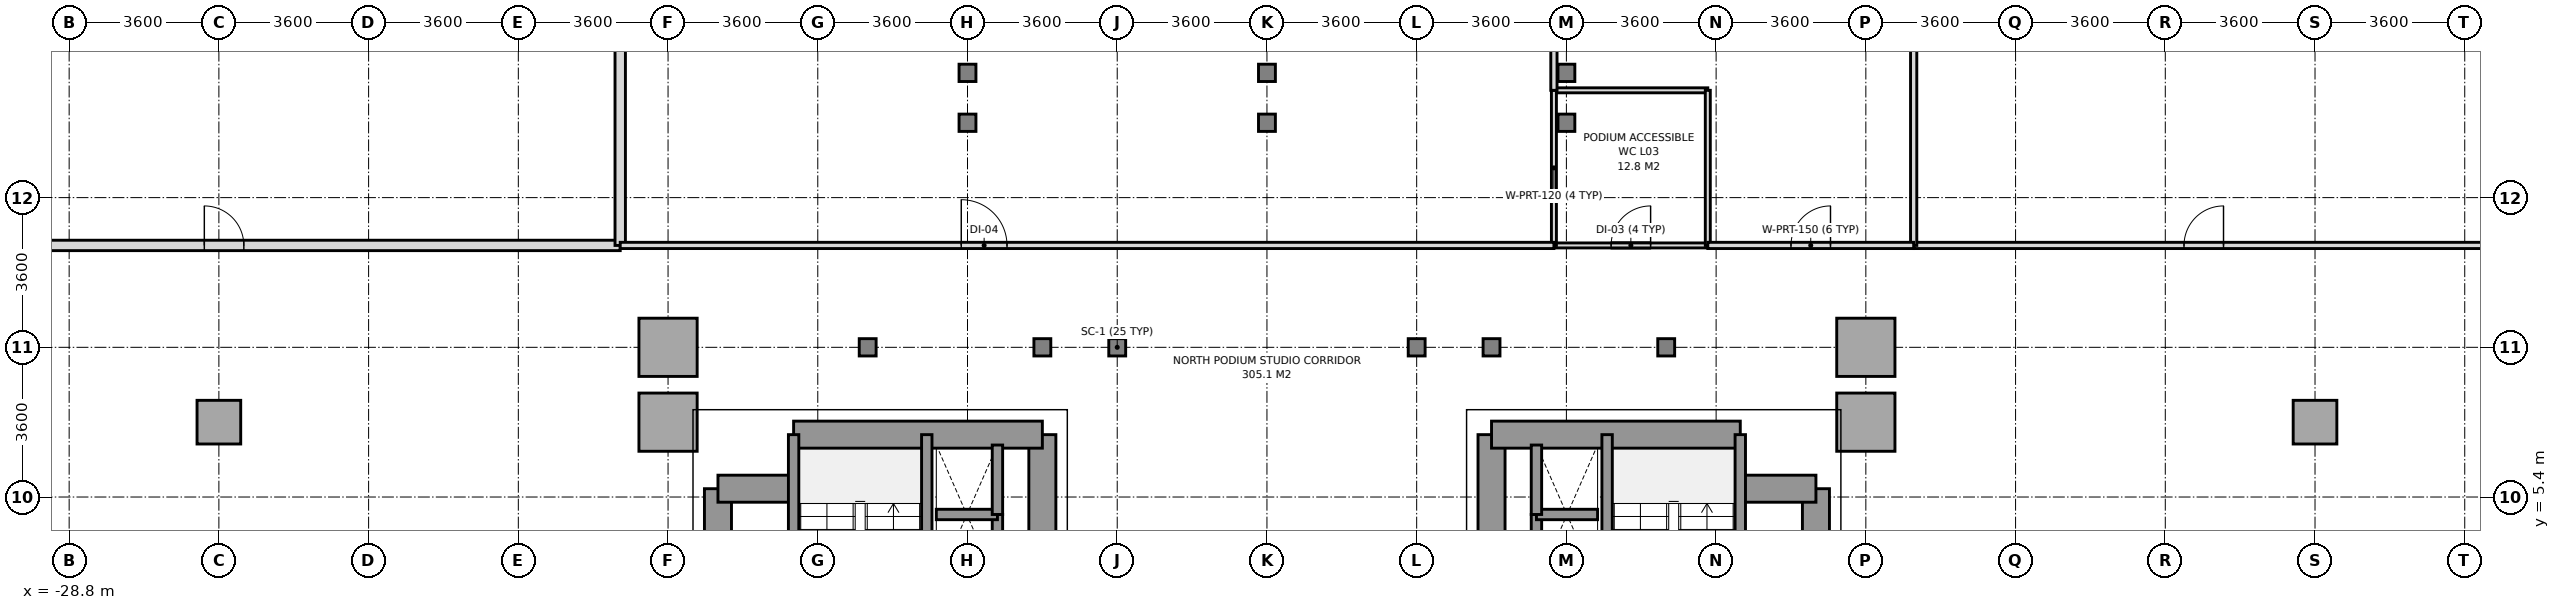
"""IFC4 building model, lengths in metres.
Left out: names, types, materials, properties, quantities, classifications, styles, units other than length and angle.
Written with IfcOpenShell. Run it as: python <this file> out.ifc"""

import sys

from ifc_helpers import new_model, si_unit, direction, frame, frame_2d, origin, origin_2d, place, context, subcontext, project, spatial, rectangle, i_section, extrude, source, transform, mapped, element, fill, save


model = new_model("IFC4")
c1 = context("Model", 3, precision=1e-05, world=origin(), true_north=direction((0.0, 1.0)))
c2 = subcontext(c1, "Body", "Model", "MODEL_VIEW")
j1 = project(units=[si_unit("LENGTHUNIT", "METRE"), si_unit("PLANEANGLEUNIT", "RADIAN")], contexts=[c1])
p1 = place(None, origin())
s1 = spatial("IfcSite", under=j1, at=p1, CompositionType="ELEMENT")
p2 = place(p1, origin())
s2 = spatial("IfcBuilding", under=s1, at=p2, CompositionType="ELEMENT")
p3 = place(p2, frame((0.0, 0.0, 15.6)))
s3 = spatial("IfcBuildingStorey", under=s2, at=p3, CompositionType="ELEMENT", Elevation=15.6)
m1 = source(origin(), c2, "Body", "SweptSolid", [
    extrude(rectangle(XDim=1.05, YDim=1.05, at=origin_2d()), origin(), (0.0, 0.0, 1.0), 4.55),
])
p4 = place(p3, frame((-25.2, 7.2, 0.0), z_axis=(0.0, 0.0, 1.0), x_axis=(1.0, 0.0, 0.0)))
e1 = element("IfcColumn", 1, at=p4, inside=s3, PredefinedType="COLUMN", context=c2, shape_type="MappedRepresentation", body=[
    mapped(m1, transform((0.0, 0.0, 0.0), x_axis=(1.0, 0.0, 0.0), y_axis=(0.0, 1.0, 0.0), z_axis=(0.0, 0.0, 1.0), scale=1.0)),
])
m2 = source(origin(), c2, "Body", "SweptSolid", [
    extrude(rectangle(XDim=1.4, YDim=1.4, at=origin_2d()), origin(), (0.0, 0.0, 1.0), 4.55),
])
for number, where, z_axis, x_axis in (
    (2, (-14.4, 7.2, 0.0), (0.0, 0.0, 1.0), (1.0, 0.0, 0.0)),
    (3, (-14.4, 9.0, 0.0), (0.0, 0.0, 1.0), (1.0, 0.0, 0.0)),
):
    element("IfcColumn", number, at=place(p3, frame(where, z_axis=z_axis, x_axis=x_axis)), inside=s3, PredefinedType="COLUMN", context=c2, shape_type="MappedRepresentation", body=[
        mapped(m2, transform((0.0, 0.0, 0.0), x_axis=(1.0, 0.0, 0.0), y_axis=(0.0, 1.0, 0.0), z_axis=(0.0, 0.0, 1.0), scale=1.0)),
    ])
m3 = source(origin(), c2, "Body", "SweptSolid", [
    extrude(i_section(OverallWidth=0.406, OverallDepth=0.416, WebThickness=0.024, FlangeThickness=0.039, at=origin_2d()), origin(), (0.0, 0.0, 1.0), 4.55),
])
for number, where, z_axis, x_axis in (
    (4, (-9.6, 9.0, 0.0), (0.0, 0.0, 1.0), (1.0, 0.0, 0.0)),
    (5, (-7.2, 14.4, 0.0), (0.0, 0.0, 1.0), (1.0, 0.0, 0.0)),
    (6, (-7.2, 15.6, 0.0), (0.0, 0.0, 1.0), (1.0, 0.0, 0.0)),
    (7, (-5.4, 9.0, 0.0), (0.0, 0.0, 1.0), (1.0, 0.0, 0.0)),
    (8, (-3.6, 9.0, 0.0), (0.0, 0.0, 1.0), (1.0, 0.0, 0.0)),
    (9, (0.0, 14.4, 0.0), (0.0, 0.0, 1.0), (1.0, 0.0, 0.0)),
    (10, (0.0, 15.6, 0.0), (0.0, 0.0, 1.0), (1.0, 0.0, 0.0)),
    (11, (3.6, 9.0, 0.0), (0.0, 0.0, 1.0), (1.0, 0.0, 0.0)),
    (12, (5.4, 9.0, 0.0), (0.0, 0.0, 1.0), (1.0, 0.0, 0.0)),
    (13, (7.2, 14.4, 0.0), (0.0, 0.0, 1.0), (1.0, 0.0, 0.0)),
    (14, (7.2, 15.6, 0.0), (0.0, 0.0, 1.0), (1.0, 0.0, 0.0)),
    (15, (9.6, 9.0, 0.0), (0.0, 0.0, 1.0), (1.0, 0.0, 0.0)),
):
    element("IfcColumn", number, at=place(p3, frame(where, z_axis=z_axis, x_axis=x_axis)), inside=s3, PredefinedType="COLUMN", context=c2, shape_type="MappedRepresentation", body=[
        mapped(m3, transform((0.0, 0.0, 0.0), x_axis=(1.0, 0.0, 0.0), y_axis=(0.0, 1.0, 0.0), z_axis=(0.0, 0.0, 1.0), scale=1.0)),
    ])
for number, where, z_axis, x_axis in (
    (16, (14.4, 7.2, 0.0), (0.0, 0.0, 1.0), (1.0, 0.0, 0.0)),
    (17, (14.4, 9.0, 0.0), (0.0, 0.0, 1.0), (1.0, 0.0, 0.0)),
):
    element("IfcColumn", number, at=place(p3, frame(where, z_axis=z_axis, x_axis=x_axis)), inside=s3, PredefinedType="COLUMN", context=c2, shape_type="MappedRepresentation", body=[
        mapped(m2, transform((0.0, 0.0, 0.0), x_axis=(1.0, 0.0, 0.0), y_axis=(0.0, 1.0, 0.0), z_axis=(0.0, 0.0, 1.0), scale=1.0)),
    ])
p5 = place(p3, frame((25.2, 7.2, 0.0), z_axis=(0.0, 0.0, 1.0), x_axis=(1.0, 0.0, 0.0)))
e18 = element("IfcColumn", 18, at=p5, inside=s3, PredefinedType="COLUMN", context=c2, shape_type="MappedRepresentation", body=[
    mapped(m1, transform((0.0, 0.0, 0.0), x_axis=(1.0, 0.0, 0.0), y_axis=(0.0, 1.0, 0.0), z_axis=(0.0, 0.0, 1.0), scale=1.0)),
])
p6 = place(p3, frame((-13.2, -5.6, 0.0), z_axis=(0.0, 0.0, 1.0), x_axis=(0.0, 1.0, 0.0)))
e19 = element("IfcWall", 19, at=p6, inside=s3, PredefinedType="SHEAR", context=c2, shape_type="SweptSolid", body=[
    extrude(rectangle(XDim=11.2, YDim=0.65, at=frame_2d((5.6, 0.0))), origin(), (0.0, 0.0, 1.0), 4.55),
])
p7 = place(p3, frame((-5.4, -5.6, 0.0), z_axis=(0.0, 0.0, 1.0), x_axis=(0.0, 1.0, 0.0)))
e20 = element("IfcWall", 20, at=p7, inside=s3, PredefinedType="SHEAR", context=c2, shape_type="SweptSolid", body=[
    extrude(rectangle(XDim=12.5, YDim=0.65, at=frame_2d((6.25, 0.0))), origin(), (0.0, 0.0, 1.0), 4.55),
])
p8 = place(p7, frame((4.55, 0.0, 0.0)))
e21 = element("IfcOpeningElement", 21, at=p8, cuts=e20, PredefinedType="OPENING", context=c2, shape_type="SweptSolid", body=[
    extrude(rectangle(XDim=1.2, YDim=2.2, at=frame_2d((0.6, 1.1))), frame((0.0, 0.335, 0.0), z_axis=(0.0, -1.0, 0.0), x_axis=(1.0, 0.0, 0.0)), (0.0, 0.0, 1.0), 0.67),
])
p9 = place(p7, frame((6.86, 0.0, 0.0)))
e22 = element("IfcOpeningElement", 22, at=p9, cuts=e20, PredefinedType="OPENING", context=c2, shape_type="SweptSolid", body=[
    extrude(rectangle(XDim=0.8, YDim=2.1, at=frame_2d((0.4, 1.05))), frame((0.0, 0.335, 0.0), z_axis=(0.0, -1.0, 0.0), x_axis=(1.0, 0.0, 0.0)), (0.0, 0.0, 1.0), 0.67),
])
p10 = place(p7, frame((7.88, 0.0, 0.0)))
e23 = element("IfcOpeningElement", 23, at=p10, cuts=e20, PredefinedType="OPENING", context=c2, shape_type="SweptSolid", body=[
    extrude(rectangle(XDim=0.8, YDim=2.1, at=frame_2d((0.4, 1.05))), frame((0.0, 0.335, 0.0), z_axis=(0.0, -1.0, 0.0), x_axis=(1.0, 0.0, 0.0)), (0.0, 0.0, 1.0), 0.67),
])
p11 = place(p3, frame((-11.381, 6.9, 0.0), z_axis=(0.0, 0.0, 1.0), x_axis=(1.0, 0.0, 0.0)))
e24 = element("IfcWall", 24, at=p11, inside=s3, PredefinedType="SHEAR", context=c2, shape_type="SweptSolid", body=[
    extrude(rectangle(XDim=5.981, YDim=0.65, at=frame_2d((2.991, 0.0))), origin(), (0.0, 0.0, 1.0), 4.55),
])
p12 = place(p3, frame((-13.2, 5.6, 0.0), z_axis=(0.0, 0.0, 1.0), x_axis=(1.0, 0.0, 0.0)))
e25 = element("IfcWall", 25, at=p12, inside=s3, PredefinedType="SHEAR", context=c2, shape_type="SweptSolid", body=[
    extrude(rectangle(XDim=1.819, YDim=0.65, at=frame_2d((0.909, 0.0))), origin(), (0.0, 0.0, 1.0), 4.55),
])
p13 = place(p3, frame((-8.179, -0.041, 0.0), z_axis=(0.0, 0.0, 1.0), x_axis=(0.0, 1.0, 0.0)))
e26 = element("IfcWall", 26, at=p13, inside=s3, PredefinedType="SOLIDWALL", context=c2, shape_type="SweptSolid", body=[
    extrude(rectangle(XDim=6.941, YDim=0.25, at=frame_2d((3.47, 0.0))), origin(), (0.0, 0.0, 1.0), 4.55),
])
p14 = place(p13, frame((0.2, 0.0, 0.0)))
e27 = element("IfcOpeningElement", 27, at=p14, cuts=e26, PredefinedType="OPENING", context=c2, shape_type="SweptSolid", body=[
    extrude(rectangle(XDim=1.2, YDim=2.2, at=frame_2d((0.6, 1.1))), frame((0.0, 0.135, 0.0), z_axis=(0.0, -1.0, 0.0), x_axis=(1.0, 0.0, 0.0)), (0.0, 0.0, 1.0), 0.27),
])
p15 = place(p3, frame((-11.381, -0.041, 0.0), z_axis=(0.0, 0.0, 1.0), x_axis=(0.0, 1.0, 0.0)))
e28 = element("IfcWall", 28, at=p15, inside=s3, PredefinedType="SOLIDWALL", context=c2, shape_type="SweptSolid", body=[
    extrude(rectangle(XDim=6.941, YDim=0.25, at=frame_2d((3.47, 0.0))), origin(), (0.0, 0.0, 1.0), 4.55),
])
p16 = place(p3, frame((13.2, -5.6, 0.0), z_axis=(0.0, 0.0, 1.0), x_axis=(0.0, 1.0, 0.0)))
e29 = element("IfcWall", 29, at=p16, inside=s3, PredefinedType="SHEAR", context=c2, shape_type="SweptSolid", body=[
    extrude(rectangle(XDim=11.2, YDim=0.65, at=frame_2d((5.6, 0.0))), origin(), (0.0, 0.0, 1.0), 4.55),
])
p17 = place(p3, frame((5.4, -5.6, 0.0), z_axis=(0.0, 0.0, 1.0), x_axis=(0.0, 1.0, 0.0)))
e30 = element("IfcWall", 30, at=p17, inside=s3, PredefinedType="SHEAR", context=c2, shape_type="SweptSolid", body=[
    extrude(rectangle(XDim=12.5, YDim=0.65, at=frame_2d((6.25, 0.0))), origin(), (0.0, 0.0, 1.0), 4.55),
])
p18 = place(p17, frame((4.55, 0.0, 0.0)))
e31 = element("IfcOpeningElement", 31, at=p18, cuts=e30, PredefinedType="OPENING", context=c2, shape_type="SweptSolid", body=[
    extrude(rectangle(XDim=1.2, YDim=2.2, at=frame_2d((0.6, 1.1))), frame((0.0, 0.335, 0.0), z_axis=(0.0, -1.0, 0.0), x_axis=(1.0, 0.0, 0.0)), (0.0, 0.0, 1.0), 0.67),
])
p19 = place(p3, frame((5.4, 6.9, 0.0), z_axis=(0.0, 0.0, 1.0), x_axis=(1.0, 0.0, 0.0)))
e32 = element("IfcWall", 32, at=p19, inside=s3, PredefinedType="SHEAR", context=c2, shape_type="SweptSolid", body=[
    extrude(rectangle(XDim=5.981, YDim=0.65, at=frame_2d((2.991, 0.0))), origin(), (0.0, 0.0, 1.0), 4.55),
])
p20 = place(p3, frame((11.381, 5.6, 0.0), z_axis=(0.0, 0.0, 1.0), x_axis=(1.0, 0.0, 0.0)))
e33 = element("IfcWall", 33, at=p20, inside=s3, PredefinedType="SHEAR", context=c2, shape_type="SweptSolid", body=[
    extrude(rectangle(XDim=1.819, YDim=0.65, at=frame_2d((0.909, 0.0))), origin(), (0.0, 0.0, 1.0), 4.55),
])
p21 = place(p3, frame((8.179, -0.041, 0.0), z_axis=(0.0, 0.0, 1.0), x_axis=(0.0, 1.0, 0.0)))
e34 = element("IfcWall", 34, at=p21, inside=s3, PredefinedType="SOLIDWALL", context=c2, shape_type="SweptSolid", body=[
    extrude(rectangle(XDim=6.941, YDim=0.25, at=frame_2d((3.47, 0.0))), origin(), (0.0, 0.0, 1.0), 4.55),
])
p22 = place(p21, frame((0.2, 0.0, 0.0)))
e35 = element("IfcOpeningElement", 35, at=p22, cuts=e34, PredefinedType="OPENING", context=c2, shape_type="SweptSolid", body=[
    extrude(rectangle(XDim=1.2, YDim=2.2, at=frame_2d((0.6, 1.1))), frame((0.0, 0.135, 0.0), z_axis=(0.0, -1.0, 0.0), x_axis=(1.0, 0.0, 0.0)), (0.0, 0.0, 1.0), 0.27),
])
p23 = place(p3, frame((11.381, -0.041, 0.0), z_axis=(0.0, 0.0, 1.0), x_axis=(0.0, 1.0, 0.0)))
e36 = element("IfcWall", 36, at=p23, inside=s3, PredefinedType="SOLIDWALL", context=c2, shape_type="SweptSolid", body=[
    extrude(rectangle(XDim=6.941, YDim=0.25, at=frame_2d((3.47, 0.0))), origin(), (0.0, 0.0, 1.0), 4.55),
])
p24 = place(p3, frame((-6.48, 3.3, 0.0), z_axis=(0.0, 0.0, 1.0), x_axis=(0.0, 1.0, 0.0)))
e37 = element("IfcWall", 37, at=p24, inside=s3, PredefinedType="SOLIDWALL", context=c2, shape_type="SweptSolid", body=[
    extrude(rectangle(XDim=1.68, YDim=0.25, at=frame_2d((0.84, 0.0))), origin(), (0.0, 0.0, 1.0), 4.55),
])
p25 = place(p3, frame((-7.95, 4.98, 0.0), z_axis=(0.0, 0.0, 1.0), x_axis=(1.0, 0.0, 0.0)))
e38 = element("IfcWall", 38, at=p25, inside=s3, PredefinedType="SOLIDWALL", context=c2, shape_type="SweptSolid", body=[
    extrude(rectangle(XDim=1.47, YDim=0.25, at=frame_2d((0.735, 0.0))), origin(), (0.0, 0.0, 1.0), 4.55),
])
p26 = place(p3, frame((-6.48, 4.98, 0.0), z_axis=(0.0, 0.0, 1.0), x_axis=(0.0, 1.0, 0.0)))
e39 = element("IfcWall", 39, at=p26, inside=s3, PredefinedType="SOLIDWALL", context=c2, shape_type="SweptSolid", body=[
    extrude(rectangle(XDim=1.67, YDim=0.25, at=frame_2d((0.835, 0.0))), origin(), (0.0, 0.0, 1.0), 4.55),
])
p27 = place(p3, frame((6.48, 3.3, 0.0), z_axis=(0.0, 0.0, 1.0), x_axis=(0.0, 1.0, 0.0)))
e40 = element("IfcWall", 40, at=p27, inside=s3, PredefinedType="SOLIDWALL", context=c2, shape_type="SweptSolid", body=[
    extrude(rectangle(XDim=1.68, YDim=0.25, at=frame_2d((0.84, 0.0))), origin(), (0.0, 0.0, 1.0), 4.55),
])
p28 = place(p3, frame((6.48, 4.98, 0.0), z_axis=(0.0, 0.0, 1.0), x_axis=(1.0, 0.0, 0.0)))
e41 = element("IfcWall", 41, at=p28, inside=s3, PredefinedType="SOLIDWALL", context=c2, shape_type="SweptSolid", body=[
    extrude(rectangle(XDim=1.47, YDim=0.25, at=frame_2d((0.735, 0.0))), origin(), (0.0, 0.0, 1.0), 4.55),
])
p29 = place(p3, frame((6.48, 4.98, 0.0), z_axis=(0.0, 0.0, 1.0), x_axis=(0.0, 1.0, 0.0)))
e42 = element("IfcWall", 42, at=p29, inside=s3, PredefinedType="SOLIDWALL", context=c2, shape_type="SweptSolid", body=[
    extrude(rectangle(XDim=1.67, YDim=0.25, at=frame_2d((0.835, 0.0))), origin(), (0.0, 0.0, 1.0), 4.55),
])
p30 = place(p3, frame((6.9, 11.45, 0.0), z_axis=(0.0, 0.0, 1.0), x_axis=(1.0, 0.0, 0.0)))
e43 = element("IfcWall", 43, at=p30, inside=s3, PredefinedType="PARTITIONING", context=c2, shape_type="SweptSolid", body=[
    extrude(rectangle(XDim=3.7, YDim=0.12, at=frame_2d((1.85, 0.0))), origin(), (0.0, 0.0, 1.0), 4.55),
])
p31 = place(p30, frame((1.375, 0.0, 0.0)))
e44 = element("IfcOpeningElement", 44, at=p31, cuts=e43, PredefinedType="OPENING", context=c2, shape_type="SweptSolid", body=[
    extrude(rectangle(XDim=0.95, YDim=2.15, at=frame_2d((0.475, 1.075))), frame((0.0, 0.07, 0.0), z_axis=(0.0, -1.0, 0.0), x_axis=(1.0, 0.0, 0.0)), (0.0, 0.0, 1.0), 0.14),
])
p32 = place(p3, frame((6.9, 15.18, 0.0), z_axis=(0.0, 0.0, 1.0), x_axis=(1.0, 0.0, 0.0)))
e45 = element("IfcWall", 45, at=p32, inside=s3, PredefinedType="PARTITIONING", context=c2, shape_type="SweptSolid", body=[
    extrude(rectangle(XDim=3.7, YDim=0.12, at=frame_2d((1.85, 0.0))), origin(), (0.0, 0.0, 1.0), 3.2),
])
p33 = place(p3, frame((6.9, 11.45, 0.0), z_axis=(0.0, 0.0, 1.0), x_axis=(0.0, 1.0, 0.0)))
e46 = element("IfcWall", 46, at=p33, inside=s3, PredefinedType="PARTITIONING", context=c2, shape_type="SweptSolid", body=[
    extrude(rectangle(XDim=3.73, YDim=0.12, at=frame_2d((1.865, 0.0))), origin(), (0.0, 0.0, 1.0), 3.2),
])
p34 = place(p3, frame((10.6, 11.45, 0.0), z_axis=(0.0, 0.0, 1.0), x_axis=(0.0, 1.0, 0.0)))
e47 = element("IfcWall", 47, at=p34, inside=s3, PredefinedType="PARTITIONING", context=c2, shape_type="SweptSolid", body=[
    extrude(rectangle(XDim=3.73, YDim=0.12, at=frame_2d((1.865, 0.0))), origin(), (0.0, 0.0, 1.0), 4.55),
])
p35 = place(p3, frame((-32.05, 11.45, 0.0), z_axis=(0.0, 0.0, 1.0), x_axis=(1.0, 0.0, 0.0)))
e48 = element("IfcWall", 48, at=p35, inside=s3, PredefinedType="SOLIDWALL", context=c2, shape_type="SweptSolid", body=[
    extrude(rectangle(XDim=16.5, YDim=0.25, at=frame_2d((8.25, 0.0))), origin(), (0.0, 0.0, 1.0), 4.55),
])
p36 = place(p35, frame((6.5, 0.0, 0.0)))
e49 = element("IfcOpeningElement", 49, at=p36, cuts=e48, PredefinedType="OPENING", context=c2, shape_type="SweptSolid", body=[
    extrude(rectangle(XDim=0.95, YDim=2.15, at=frame_2d((0.475, 1.075))), frame((0.0, 0.135, 0.0), z_axis=(0.0, -1.0, 0.0), x_axis=(1.0, 0.0, 0.0)), (0.0, 0.0, 1.0), 0.27),
])
p37 = place(p3, frame((-15.55, 11.45, 0.0), z_axis=(0.0, 0.0, 1.0), x_axis=(0.0, 1.0, 0.0)))
e50 = element("IfcWall", 50, at=p37, inside=s3, PredefinedType="SOLIDWALL", context=c2, shape_type="SweptSolid", body=[
    extrude(rectangle(XDim=11.6, YDim=0.25, at=frame_2d((5.8, 0.0))), origin(), (0.0, 0.0, 1.0), 4.55),
])
p38 = place(p3, frame((15.55, 11.45, 0.0), z_axis=(0.0, 0.0, 1.0), x_axis=(1.0, 0.0, 0.0)))
e51 = element("IfcWall", 51, at=p38, inside=s3, PredefinedType="PARTITIONING", context=c2, shape_type="SweptSolid", body=[
    extrude(rectangle(XDim=16.5, YDim=0.15, at=frame_2d((8.25, 0.0))), origin(), (0.0, 0.0, 1.0), 4.55),
])
p39 = place(p38, frame((6.5, 0.0, 0.0)))
e52 = element("IfcOpeningElement", 52, at=p39, cuts=e51, PredefinedType="OPENING", context=c2, shape_type="SweptSolid", body=[
    extrude(rectangle(XDim=0.95, YDim=2.15, at=frame_2d((0.475, 1.075))), frame((0.0, 0.085, 0.0), z_axis=(0.0, -1.0, 0.0), x_axis=(1.0, 0.0, 0.0)), (0.0, 0.0, 1.0), 0.17),
])
p40 = place(p3, frame((15.55, 11.45, 0.0), z_axis=(0.0, 0.0, 1.0), x_axis=(0.0, 1.0, 0.0)))
e53 = element("IfcWall", 53, at=p40, inside=s3, PredefinedType="PARTITIONING", context=c2, shape_type="SweptSolid", body=[
    extrude(rectangle(XDim=11.6, YDim=0.15, at=frame_2d((5.8, 0.0))), origin(), (0.0, 0.0, 1.0), 4.55),
])
p41 = place(p3, frame((-15.55, 11.45, 0.0), z_axis=(0.0, 0.0, 1.0), x_axis=(1.0, 0.0, 0.0)))
e54 = element("IfcWall", 54, at=p41, inside=s3, PredefinedType="PARTITIONING", context=c2, shape_type="SweptSolid", body=[
    extrude(rectangle(XDim=22.45, YDim=0.15, at=frame_2d((11.225, 0.0))), origin(), (0.0, 0.0, 1.0), 3.95),
])
p42 = place(p41, frame((8.2, 0.0, 0.0)))
e55 = element("IfcOpeningElement", 55, at=p42, cuts=e54, PredefinedType="OPENING", context=c2, shape_type="SweptSolid", body=[
    extrude(rectangle(XDim=1.1, YDim=2.2, at=frame_2d((0.55, 1.1))), frame((0.0, 0.085, 0.0), z_axis=(0.0, -1.0, 0.0), x_axis=(1.0, 0.0, 0.0)), (0.0, 0.0, 1.0), 0.17),
])
p43 = place(p3, frame((6.9, 15.18, 0.0), z_axis=(0.0, 0.0, 1.0), x_axis=(0.0, 1.0, 0.0)))
e56 = element("IfcWall", 56, at=p43, inside=s3, PredefinedType="PARTITIONING", context=c2, shape_type="SweptSolid", body=[
    extrude(rectangle(XDim=7.87, YDim=0.15, at=frame_2d((3.935, 0.0))), origin(), (0.0, 0.0, 1.0), 3.2),
])
p44 = place(p3, frame((10.6, 11.45, 0.0), z_axis=(0.0, 0.0, 1.0), x_axis=(1.0, 0.0, 0.0)))
e57 = element("IfcWall", 57, at=p44, inside=s3, PredefinedType="PARTITIONING", context=c2, shape_type="SweptSolid", body=[
    extrude(rectangle(XDim=4.95, YDim=0.15, at=frame_2d((2.475, 0.0))), origin(), (0.0, 0.0, 1.0), 3.95),
])
p45 = place(p44, frame((2.0, 0.0, 0.0)))
e58 = element("IfcOpeningElement", 58, at=p45, cuts=e57, PredefinedType="OPENING", context=c2, shape_type="SweptSolid", body=[
    extrude(rectangle(XDim=0.95, YDim=2.15, at=frame_2d((0.475, 1.075))), frame((0.0, 0.085, 0.0), z_axis=(0.0, -1.0, 0.0), x_axis=(1.0, 0.0, 0.0)), (0.0, 0.0, 1.0), 0.17),
])
m4 = source(origin(), c2, "Body", "SweptSolid", [
    extrude(rectangle(XDim=0.95, YDim=2.15, at=frame_2d((0.475, 1.075))), frame((0.0, 0.025, 0.0), z_axis=(0.0, -1.0, 0.0), x_axis=(1.0, 0.0, 0.0)), (0.0, 0.0, 1.0), 0.05),
])
p46 = place(p31, origin())
e59 = element("IfcDoor", 59, at=p46, inside=s3, OperationType="SINGLE_SWING_RIGHT", PredefinedType="DOOR", context=c2, shape_type="MappedRepresentation", body=[
    mapped(m4, transform((0.0, 0.0, 0.0), x_axis=(1.0, 0.0, 0.0), y_axis=(0.0, 1.0, 0.0), z_axis=(0.0, 0.0, 1.0), scale=1.0)),
])
fill(e44, e59)
p47 = place(p36, origin())
e60 = element("IfcDoor", 60, at=p47, inside=s3, OperationType="SINGLE_SWING_LEFT", PredefinedType="DOOR", context=c2, shape_type="MappedRepresentation", body=[
    mapped(m4, transform((0.0, 0.0, 0.0), x_axis=(1.0, 0.0, 0.0), y_axis=(0.0, 1.0, 0.0), z_axis=(0.0, 0.0, 1.0), scale=1.0)),
])
fill(e49, e60)
p48 = place(p39, origin())
e61 = element("IfcDoor", 61, at=p48, inside=s3, OperationType="SINGLE_SWING_RIGHT", PredefinedType="DOOR", context=c2, shape_type="MappedRepresentation", body=[
    mapped(m4, transform((0.0, 0.0, 0.0), x_axis=(1.0, 0.0, 0.0), y_axis=(0.0, 1.0, 0.0), z_axis=(0.0, 0.0, 1.0), scale=1.0)),
])
fill(e52, e61)
m5 = source(origin(), c2, "Body", "SweptSolid", [
    extrude(rectangle(XDim=1.1, YDim=2.2, at=frame_2d((0.55, 1.1))), frame((0.0, 0.025, 0.0), z_axis=(0.0, -1.0, 0.0), x_axis=(1.0, 0.0, 0.0)), (0.0, 0.0, 1.0), 0.05),
])
p49 = place(p42, origin())
e62 = element("IfcDoor", 62, at=p49, inside=s3, OperationType="SINGLE_SWING_LEFT", PredefinedType="DOOR", context=c2, shape_type="MappedRepresentation", body=[
    mapped(m5, transform((0.0, 0.0, 0.0), x_axis=(1.0, 0.0, 0.0), y_axis=(0.0, 1.0, 0.0), z_axis=(0.0, 0.0, 1.0), scale=1.0)),
])
fill(e55, e62)
p50 = place(p45, origin())
e63 = element("IfcDoor", 63, at=p50, inside=s3, OperationType="SINGLE_SWING_RIGHT", PredefinedType="DOOR", context=c2, shape_type="MappedRepresentation", body=[
    mapped(m4, transform((0.0, 0.0, 0.0), x_axis=(1.0, 0.0, 0.0), y_axis=(0.0, 1.0, 0.0), z_axis=(0.0, 0.0, 1.0), scale=1.0)),
])
fill(e58, e63)
save(model, sys.argv[1])
